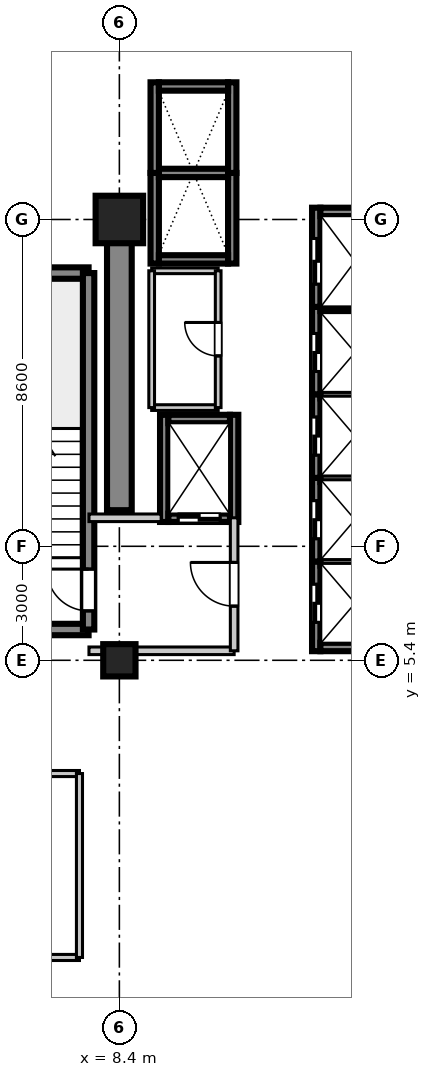
"""IFC4 building model, lengths in metres.
Left out: names, types, materials, properties, quantities, classifications, styles, units other than length and angle.
Written with IfcOpenShell. Run it as: python <this file> out.ifc"""

import sys

from ifc_helpers import new_model, si_unit, direction, frame, frame_2d, origin, origin_2d, place, context, subcontext, project, spatial, rectangle, extrude, source, transform, mapped, element, fill, save


model = new_model("IFC4")
c1 = context("Model", 3, precision=1e-05, world=origin(), true_north=direction((0.0, 1.0)))
c2 = subcontext(c1, "Body", "Model", "MODEL_VIEW")
j1 = project(units=[si_unit("LENGTHUNIT", "METRE"), si_unit("PLANEANGLEUNIT", "RADIAN")], contexts=[c1])
p1 = place(None, origin())
s1 = spatial("IfcSite", under=j1, at=p1, CompositionType="ELEMENT")
p2 = place(p1, origin())
s2 = spatial("IfcBuilding", under=s1, at=p2, CompositionType="ELEMENT")
p3 = place(p2, frame((0.0, 0.0, 102.9)))
s3 = spatial("IfcBuildingStorey", under=s2, at=p3, CompositionType="ELEMENT", Elevation=102.9)
m1 = source(origin(), c2, "Body", "SweptSolid", [
    extrude(rectangle(XDim=0.85, YDim=0.85, at=origin_2d()), origin(), (0.0, 0.0, 1.0), 3.605),
])
p4 = place(p3, frame((8.4, 5.4, 0.0), z_axis=(0.0, 0.0, 1.0), x_axis=(1.0, 0.0, 0.0)))
e1 = element("IfcColumn", 1, at=p4, inside=s3, PredefinedType="PILASTER", context=c2, shape_type="MappedRepresentation", body=[
    mapped(m1, transform((0.0, 0.0, 0.0), scale=1.0)),
])
m2 = source(origin(), c2, "Body", "SweptSolid", [
    extrude(rectangle(XDim=1.25, YDim=1.25, at=origin_2d()), origin(), (0.0, 0.0, 1.0), 3.605),
])
p5 = place(p3, frame((8.4, 17.0, 0.0), z_axis=(0.0, 0.0, 1.0), x_axis=(1.0, 0.0, 0.0)))
e2 = element("IfcColumn", 2, at=p5, inside=s3, PredefinedType="COLUMN", context=c2, shape_type="MappedRepresentation", body=[
    mapped(m2, transform((0.0, 0.0, 0.0), scale=1.0)),
])
m3 = source(origin(), c2, "Body", "SweptSolid", [
    extrude(rectangle(XDim=7.65, YDim=0.65, at=frame_2d((3.825, 0.0))), origin(), (0.0, 0.0, 1.0), 3.38),
])
p6 = place(p3, frame((8.4, 9.35, 0.0), z_axis=(0.0, 0.0, 1.0), x_axis=(0.0, 1.0, 0.0)))
e3 = element("IfcWall", 3, at=p6, inside=s3, PredefinedType="SHEAR", context=c2, shape_type="MappedRepresentation", body=[
    mapped(m3, transform((0.0, 0.0, 0.0), scale=1.0)),
])
m4 = source(origin(), c2, "Body", "SweptSolid", [
    extrude(rectangle(XDim=3.98, YDim=0.3, at=frame_2d((1.99, 0.0))), origin(), (0.0, 0.0, 1.0), 3.38),
])
for number, where, z_axis, x_axis in (
    (4, (3.61, 6.21, 0.0), (0.0, 0.0, 1.0), (1.0, 0.0, 0.0)),
    (5, (3.61, 15.59, 0.0), (0.0, 0.0, 1.0), (1.0, 0.0, 0.0)),
):
    element("IfcWall", number, at=place(p3, frame(where, z_axis=z_axis, x_axis=x_axis)), inside=s3, PredefinedType="SHEAR", context=c2, shape_type="MappedRepresentation", body=[
        mapped(m4, transform((0.0, 0.0, 0.0), scale=1.0)),
    ])
m5 = source(origin(), c2, "Body", "SweptSolid", [
    extrude(rectangle(XDim=9.38, YDim=0.3, at=frame_2d((4.69, 0.0))), origin(), (0.0, 0.0, 1.0), 3.38),
])
p7 = place(p3, frame((7.59, 6.21, 0.0), z_axis=(0.0, 0.0, 1.0), x_axis=(0.0, 1.0, 0.0)))
e6 = element("IfcWall", 6, at=p7, inside=s3, PredefinedType="SHEAR", context=c2, shape_type="MappedRepresentation", body=[
    mapped(m5, transform((0.0, 0.0, 0.0), scale=1.0)),
])
p8 = place(p7, frame((0.49, 0.0, 0.0)))
e7 = element("IfcOpeningElement", 7, at=p8, cuts=e6, PredefinedType="OPENING", context=c2, shape_type="SweptSolid", body=[
    extrude(rectangle(XDim=1.1, YDim=2.15, at=frame_2d((0.55, 1.075))), frame((0.0, 0.16, 0.0), z_axis=(0.0, -1.0, 0.0), x_axis=(1.0, 0.0, 0.0)), (0.0, 0.0, 1.0), 0.32),
])
m6 = source(origin(), c2, "Body", "SweptSolid", [
    extrude(rectangle(XDim=2.36, YDim=0.22, at=frame_2d((1.18, 0.0))), origin(), (0.0, 0.0, 1.0), 3.38),
])
p9 = place(p3, frame((13.58, 5.64, 0.0), z_axis=(0.0, 0.0, 1.0), x_axis=(0.0, 1.0, 0.0)))
e8 = element("IfcWall", 8, at=p9, inside=s3, PredefinedType="SHEAR", context=c2, shape_type="MappedRepresentation", body=[
    mapped(m6, transform((0.0, 0.0, 0.0), scale=1.0)),
])
p10 = place(p9, frame((0.76, 0.0, 0.0)))
e9 = element("IfcOpeningElement", 9, at=p10, cuts=e8, PredefinedType="OPENING", context=c2, shape_type="SweptSolid", body=[
    extrude(rectangle(XDim=1.0, YDim=2.2, at=frame_2d((0.5, 1.1))), frame((0.0, 0.12, 0.0), z_axis=(0.0, -1.0, 0.0), x_axis=(1.0, 0.0, 0.0)), (0.0, 0.0, 1.0), 0.24),
])
m7 = source(origin(), c2, "Body", "SweptSolid", [
    extrude(rectangle(XDim=1.82, YDim=0.22, at=frame_2d((0.91, 0.0))), origin(), (0.0, 0.0, 1.0), 3.38),
])
p11 = place(p3, frame((13.69, 5.75, 0.0), z_axis=(0.0, 0.0, 1.0), x_axis=(1.0, 0.0, 0.0)))
e10 = element("IfcWall", 10, at=p11, inside=s3, PredefinedType="SHEAR", context=c2, shape_type="MappedRepresentation", body=[
    mapped(m7, transform((0.0, 0.0, 0.0), scale=1.0)),
])
m8 = source(origin(), c2, "Body", "SweptSolid", [
    extrude(rectangle(XDim=1.82, YDim=0.22, at=frame_2d((0.91, 0.0))), origin(), (0.0, 0.0, 1.0), 3.65),
])
p12 = place(p3, frame((13.69, 8.0, 0.0), z_axis=(0.0, 0.0, 1.0), x_axis=(1.0, 0.0, 0.0)))
e11 = element("IfcWall", 11, at=p12, inside=s3, PredefinedType="SHEAR", context=c2, shape_type="MappedRepresentation", body=[
    mapped(m8, transform((0.0, 0.0, 0.0), scale=1.0)),
])
m9 = source(origin(), c2, "Body", "SweptSolid", [
    extrude(rectangle(XDim=2.2, YDim=0.22, at=frame_2d((1.1, 0.0))), origin(), (0.0, 0.0, 1.0), 3.38),
])
p13 = place(p3, frame((13.58, 8.0, 0.0), z_axis=(0.0, 0.0, 1.0), x_axis=(0.0, 1.0, 0.0)))
e12 = element("IfcWall", 12, at=p13, inside=s3, PredefinedType="SHEAR", context=c2, shape_type="MappedRepresentation", body=[
    mapped(m9, transform((0.0, 0.0, 0.0), scale=1.0)),
])
p14 = place(p13, frame((0.6, 0.0, 0.0)))
e13 = element("IfcOpeningElement", 13, at=p14, cuts=e12, PredefinedType="OPENING", context=c2, shape_type="SweptSolid", body=[
    extrude(rectangle(XDim=1.0, YDim=2.2, at=frame_2d((0.5, 1.1))), frame((0.0, 0.12, 0.0), z_axis=(0.0, -1.0, 0.0), x_axis=(1.0, 0.0, 0.0)), (0.0, 0.0, 1.0), 0.24),
])
p15 = place(p3, frame((13.69, 10.2, 0.0), z_axis=(0.0, 0.0, 1.0), x_axis=(1.0, 0.0, 0.0)))
e14 = element("IfcWall", 14, at=p15, inside=s3, PredefinedType="SHEAR", context=c2, shape_type="MappedRepresentation", body=[
    mapped(m8, transform((0.0, 0.0, 0.0), scale=1.0)),
])
p16 = place(p3, frame((13.58, 10.2, 0.0), z_axis=(0.0, 0.0, 1.0), x_axis=(0.0, 1.0, 0.0)))
e15 = element("IfcWall", 15, at=p16, inside=s3, PredefinedType="SHEAR", context=c2, shape_type="MappedRepresentation", body=[
    mapped(m9, transform((0.0, 0.0, 0.0), scale=1.0)),
])
p17 = place(p16, frame((0.6, 0.0, 0.0)))
e16 = element("IfcOpeningElement", 16, at=p17, cuts=e15, PredefinedType="OPENING", context=c2, shape_type="SweptSolid", body=[
    extrude(rectangle(XDim=1.0, YDim=2.2, at=frame_2d((0.5, 1.1))), frame((0.0, 0.12, 0.0), z_axis=(0.0, -1.0, 0.0), x_axis=(1.0, 0.0, 0.0)), (0.0, 0.0, 1.0), 0.24),
])
p18 = place(p3, frame((13.69, 12.4, 0.0), z_axis=(0.0, 0.0, 1.0), x_axis=(1.0, 0.0, 0.0)))
e17 = element("IfcWall", 17, at=p18, inside=s3, PredefinedType="SHEAR", context=c2, shape_type="MappedRepresentation", body=[
    mapped(m8, transform((0.0, 0.0, 0.0), scale=1.0)),
])
m10 = source(origin(), c2, "Body", "SweptSolid", [
    extrude(rectangle(XDim=2.3, YDim=0.22, at=frame_2d((1.15, 0.0))), origin(), (0.0, 0.0, 1.0), 3.38),
])
p19 = place(p3, frame((13.58, 12.4, 0.0), z_axis=(0.0, 0.0, 1.0), x_axis=(0.0, 1.0, 0.0)))
e18 = element("IfcWall", 18, at=p19, inside=s3, PredefinedType="SHEAR", context=c2, shape_type="MappedRepresentation", body=[
    mapped(m10, transform((0.0, 0.0, 0.0), scale=1.0)),
])
p20 = place(p19, frame((0.6, 0.0, 0.0)))
e19 = element("IfcOpeningElement", 19, at=p20, cuts=e18, PredefinedType="OPENING", context=c2, shape_type="SweptSolid", body=[
    extrude(rectangle(XDim=1.0, YDim=2.2, at=frame_2d((0.5, 1.1))), frame((0.0, 0.12, 0.0), z_axis=(0.0, -1.0, 0.0), x_axis=(1.0, 0.0, 0.0)), (0.0, 0.0, 1.0), 0.24),
])
p21 = place(p3, frame((13.69, 14.7, 0.0), z_axis=(0.0, 0.0, 1.0), x_axis=(1.0, 0.0, 0.0)))
e20 = element("IfcWall", 20, at=p21, inside=s3, PredefinedType="SHEAR", context=c2, shape_type="MappedRepresentation", body=[
    mapped(m8, transform((0.0, 0.0, 0.0), scale=1.0)),
])
m11 = source(origin(), c2, "Body", "SweptSolid", [
    extrude(rectangle(XDim=2.385, YDim=0.22, at=frame_2d((1.192, 0.0))), origin(), (0.0, 0.0, 1.0), 3.38),
])
for number, where, z_axis, x_axis in (
    (21, (9.33, 15.84, 0.0), (0.0, 0.0, 1.0), (0.0, 1.0, 0.0)),
    (22, (11.37, 15.84, 0.0), (0.0, 0.0, 1.0), (0.0, 1.0, 0.0)),
):
    element("IfcWall", number, at=place(p3, frame(where, z_axis=z_axis, x_axis=x_axis)), inside=s3, PredefinedType="SHEAR", context=c2, shape_type="MappedRepresentation", body=[
        mapped(m11, transform((0.0, 0.0, 0.0), scale=1.0)),
    ])
p22 = place(p3, frame((9.44, 15.95, 0.0), z_axis=(0.0, 0.0, 1.0), x_axis=(1.0, 0.0, 0.0)))
e23 = element("IfcWall", 23, at=p22, inside=s3, PredefinedType="SHEAR", context=c2, shape_type="MappedRepresentation", body=[
    mapped(m7, transform((0.0, 0.0, 0.0), scale=1.0)),
])
p23 = place(p3, frame((9.44, 18.225, 0.0), z_axis=(0.0, 0.0, 1.0), x_axis=(1.0, 0.0, 0.0)))
e24 = element("IfcWall", 24, at=p23, inside=s3, PredefinedType="SHEAR", context=c2, shape_type="MappedRepresentation", body=[
    mapped(m8, transform((0.0, 0.0, 0.0), scale=1.0)),
])
for number, where, z_axis, x_axis in (
    (25, (9.33, 18.225, 0.0), (0.0, 0.0, 1.0), (0.0, 1.0, 0.0)),
    (26, (11.37, 18.225, 0.0), (0.0, 0.0, 1.0), (0.0, 1.0, 0.0)),
):
    element("IfcWall", number, at=place(p3, frame(where, z_axis=z_axis, x_axis=x_axis)), inside=s3, PredefinedType="SHEAR", context=c2, shape_type="MappedRepresentation", body=[
        mapped(m11, transform((0.0, 0.0, 0.0), scale=1.0)),
    ])
p24 = place(p3, frame((9.44, 20.5, 0.0), z_axis=(0.0, 0.0, 1.0), x_axis=(1.0, 0.0, 0.0)))
e27 = element("IfcWall", 27, at=p24, inside=s3, PredefinedType="SHEAR", context=c2, shape_type="MappedRepresentation", body=[
    mapped(m7, transform((0.0, 0.0, 0.0), scale=1.0)),
])
m12 = source(origin(), c2, "Body", "SweptSolid", [
    extrude(rectangle(XDim=2.82, YDim=0.22, at=frame_2d((1.41, 0.0))), origin(), (0.0, 0.0, 1.0), 3.38),
])
for number, where, z_axis, x_axis in (
    (28, (9.58, 9.04, 0.0), (0.0, 0.0, 1.0), (0.0, 1.0, 0.0)),
    (29, (11.42, 9.04, 0.0), (0.0, 0.0, 1.0), (0.0, 1.0, 0.0)),
):
    element("IfcWall", number, at=place(p3, frame(where, z_axis=z_axis, x_axis=x_axis)), inside=s3, PredefinedType="SHEAR", context=c2, shape_type="MappedRepresentation", body=[
        mapped(m12, transform((0.0, 0.0, 0.0), scale=1.0)),
    ])
m13 = source(origin(), c2, "Body", "SweptSolid", [
    extrude(rectangle(XDim=1.62, YDim=0.22, at=frame_2d((0.81, 0.0))), origin(), (0.0, 0.0, 1.0), 3.38),
])
p25 = place(p3, frame((9.69, 9.15, 0.0), z_axis=(0.0, 0.0, 1.0), x_axis=(1.0, 0.0, 0.0)))
e30 = element("IfcWall", 30, at=p25, inside=s3, PredefinedType="SHEAR", context=c2, shape_type="MappedRepresentation", body=[
    mapped(m13, transform((0.0, 0.0, 0.0), scale=1.0)),
])
p26 = place(p25, frame((0.26, 0.0, 0.0)))
e31 = element("IfcOpeningElement", 31, at=p26, cuts=e30, PredefinedType="OPENING", context=c2, shape_type="SweptSolid", body=[
    extrude(rectangle(XDim=1.1, YDim=2.2, at=frame_2d((0.55, 1.1))), frame((0.0, 0.12, 0.0), z_axis=(0.0, -1.0, 0.0), x_axis=(1.0, 0.0, 0.0)), (0.0, 0.0, 1.0), 0.24),
])
p27 = place(p3, frame((9.69, 11.75, 0.0), z_axis=(0.0, 0.0, 1.0), x_axis=(1.0, 0.0, 0.0)))
e32 = element("IfcWall", 32, at=p27, inside=s3, PredefinedType="SHEAR", context=c2, shape_type="MappedRepresentation", body=[
    mapped(m13, transform((0.0, 0.0, 0.0), scale=1.0)),
])
m14 = source(origin(), c2, "Body", "SweptSolid", [
    extrude(rectangle(XDim=2.61, YDim=0.22, at=frame_2d((1.305, 0.0))), origin(), (0.0, 0.0, 1.0), 3.38),
])
p28 = place(p3, frame((13.58, 14.7, 0.0), z_axis=(0.0, 0.0, 1.0), x_axis=(0.0, 1.0, 0.0)))
e33 = element("IfcWall", 33, at=p28, inside=s3, PredefinedType="SHEAR", context=c2, shape_type="MappedRepresentation", body=[
    mapped(m14, transform((0.0, 0.0, 0.0), scale=1.0)),
])
p29 = place(p28, frame((0.6, 0.0, 0.0)))
e34 = element("IfcOpeningElement", 34, at=p29, cuts=e33, PredefinedType="OPENING", context=c2, shape_type="SweptSolid", body=[
    extrude(rectangle(XDim=1.2, YDim=2.2, at=frame_2d((0.6, 1.1))), frame((0.0, 0.12, 0.0), z_axis=(0.0, -1.0, 0.0), x_axis=(1.0, 0.0, 0.0)), (0.0, 0.0, 1.0), 0.24),
])
p30 = place(p3, frame((13.69, 17.2, 0.0), z_axis=(0.0, 0.0, 1.0), x_axis=(1.0, 0.0, 0.0)))
e35 = element("IfcWall", 35, at=p30, inside=s3, PredefinedType="SHEAR", context=c2, shape_type="MappedRepresentation", body=[
    mapped(m7, transform((0.0, 0.0, 0.0), scale=1.0)),
])
m15 = source(origin(), c2, "Body", "SweptSolid", [
    extrude(rectangle(XDim=3.82, YDim=0.2, at=frame_2d((1.91, 0.0))), origin(), (0.0, 0.0, 1.0), 2.72),
])
p31 = place(p3, frame((7.6, 5.65, 0.0), z_axis=(0.0, 0.0, 1.0), x_axis=(1.0, 0.0, 0.0)))
e36 = element("IfcWall", 36, at=p31, inside=s3, PredefinedType="PARTITIONING", context=c2, shape_type="MappedRepresentation", body=[
    mapped(m15, transform((0.0, 0.0, 0.0), scale=1.0)),
])
m16 = source(origin(), c2, "Body", "SweptSolid", [
    extrude(rectangle(XDim=1.9, YDim=0.2, at=frame_2d((0.95, 0.0))), origin(), (0.0, 0.0, 1.0), 2.72),
])
p32 = place(p3, frame((7.6, 9.15, 0.0), z_axis=(0.0, 0.0, 1.0), x_axis=(1.0, 0.0, 0.0)))
e37 = element("IfcWall", 37, at=p32, inside=s3, PredefinedType="PARTITIONING", context=c2, shape_type="MappedRepresentation", body=[
    mapped(m16, transform((0.0, 0.0, 0.0), scale=1.0)),
])
m17 = source(origin(), c2, "Body", "SweptSolid", [
    extrude(rectangle(XDim=3.5, YDim=0.2, at=frame_2d((1.75, 0.0))), origin(), (0.0, 0.0, 1.0), 2.72),
])
p33 = place(p3, frame((11.42, 5.65, 0.0), z_axis=(0.0, 0.0, 1.0), x_axis=(0.0, 1.0, 0.0)))
e38 = element("IfcWall", 38, at=p33, inside=s3, PredefinedType="PARTITIONING", context=c2, shape_type="MappedRepresentation", body=[
    mapped(m17, transform((0.0, 0.0, 0.0), scale=1.0)),
])
p34 = place(p33, frame((1.175, 0.0, 0.0)))
e39 = element("IfcOpeningElement", 39, at=p34, cuts=e38, PredefinedType="OPENING", context=c2, shape_type="SweptSolid", body=[
    extrude(rectangle(XDim=1.15, YDim=2.15, at=frame_2d((0.575, 1.075))), frame((0.0, 0.11, 0.0), z_axis=(0.0, -1.0, 0.0), x_axis=(1.0, 0.0, 0.0)), (0.0, 0.0, 1.0), 0.22),
])
m18 = source(origin(), c2, "Body", "SweptSolid", [
    extrude(rectangle(XDim=1.75, YDim=0.15, at=frame_2d((0.875, 0.0))), origin(), (0.0, 0.0, 1.0), 2.72),
])
for number, where, z_axis, x_axis in (
    (40, (9.25, 12.05, 0.0), (0.0, 0.0, 1.0), (1.0, 0.0, 0.0)),
    (41, (9.25, 15.65, 0.0), (0.0, 0.0, 1.0), (1.0, 0.0, 0.0)),
):
    element("IfcWall", number, at=place(p3, frame(where, z_axis=z_axis, x_axis=x_axis)), inside=s3, PredefinedType="PARTITIONING", context=c2, shape_type="MappedRepresentation", body=[
        mapped(m18, transform((0.0, 0.0, 0.0), scale=1.0)),
    ])
m19 = source(origin(), c2, "Body", "SweptSolid", [
    extrude(rectangle(XDim=3.6, YDim=0.15, at=frame_2d((1.8, 0.0))), origin(), (0.0, 0.0, 1.0), 2.72),
])
p35 = place(p3, frame((9.25, 12.05, 0.0), z_axis=(0.0, 0.0, 1.0), x_axis=(0.0, 1.0, 0.0)))
e42 = element("IfcWall", 42, at=p35, inside=s3, PredefinedType="PARTITIONING", context=c2, shape_type="MappedRepresentation", body=[
    mapped(m19, transform((0.0, 0.0, 0.0), scale=1.0)),
])
p36 = place(p3, frame((11.0, 12.05, 0.0), z_axis=(0.0, 0.0, 1.0), x_axis=(0.0, 1.0, 0.0)))
e43 = element("IfcWall", 43, at=p36, inside=s3, PredefinedType="PARTITIONING", context=c2, shape_type="MappedRepresentation", body=[
    mapped(m19, transform((0.0, 0.0, 0.0), scale=1.0)),
])
p37 = place(p36, frame((1.36, 0.0, 0.0)))
e44 = element("IfcOpeningElement", 44, at=p37, cuts=e43, PredefinedType="OPENING", context=c2, shape_type="SweptSolid", body=[
    extrude(rectangle(XDim=0.88, YDim=2.1, at=frame_2d((0.44, 1.05))), frame((0.0, 0.085, 0.0), z_axis=(0.0, -1.0, 0.0), x_axis=(1.0, 0.0, 0.0)), (0.0, 0.0, 1.0), 0.17),
])
m20 = source(origin(), c2, "Body", "SweptSolid", [
    extrude(rectangle(XDim=6.732, YDim=0.16, at=frame_2d((3.366, 0.0))), origin(), (0.0, 0.0, 1.0), 2.72),
])
p38 = place(p3, frame((0.618, -2.42, 0.0), z_axis=(0.0, 0.0, 1.0), x_axis=(1.0, 0.0, 0.0)))
e45 = element("IfcWall", 45, at=p38, inside=s3, PredefinedType="PARTITIONING", context=c2, shape_type="MappedRepresentation", body=[
    mapped(m20, transform((0.0, 0.0, 0.0), scale=1.0)),
])
p39 = place(p3, frame((0.618, 2.42, 0.0), z_axis=(0.0, 0.0, 1.0), x_axis=(1.0, 0.0, 0.0)))
e46 = element("IfcWall", 46, at=p39, inside=s3, PredefinedType="PARTITIONING", context=c2, shape_type="MappedRepresentation", body=[
    mapped(m20, transform((0.0, 0.0, 0.0), scale=1.0)),
])
p40 = place(p39, frame((4.379, 0.0, 0.0)))
e47 = element("IfcOpeningElement", 47, at=p40, cuts=e46, PredefinedType="OPENING", context=c2, shape_type="SweptSolid", body=[
    extrude(rectangle(XDim=1.0, YDim=2.1, at=frame_2d((0.5, 1.05))), frame((0.0, 0.09, 0.0), z_axis=(0.0, -1.0, 0.0), x_axis=(1.0, 0.0, 0.0)), (0.0, 0.0, 1.0), 0.18),
])
m21 = source(origin(), c2, "Body", "SweptSolid", [
    extrude(rectangle(XDim=4.84, YDim=0.16, at=frame_2d((2.42, 0.0))), origin(), (0.0, 0.0, 1.0), 2.72),
])
p41 = place(p3, frame((7.35, -2.42, 0.0), z_axis=(0.0, 0.0, 1.0), x_axis=(0.0, 1.0, 0.0)))
e48 = element("IfcWall", 48, at=p41, inside=s3, PredefinedType="PARTITIONING", context=c2, shape_type="MappedRepresentation", body=[
    mapped(m21, transform((0.0, 0.0, 0.0), scale=1.0)),
])
m22 = source(origin(), c2, "Body", "SweptSolid", [
    extrude(rectangle(XDim=1.1, YDim=2.15, at=frame_2d((0.55, 1.075))), frame((0.0, 0.025, 0.0), z_axis=(0.0, -1.0, 0.0), x_axis=(1.0, 0.0, 0.0)), (0.0, 0.0, 1.0), 0.05),
])
p42 = place(p8, origin())
e49 = element("IfcDoor", 49, at=p42, inside=s3, OperationType="SINGLE_SWING_RIGHT", PredefinedType="DOOR", context=c2, shape_type="MappedRepresentation", body=[
    mapped(m22, transform((0.0, 0.0, 0.0), scale=1.0)),
])
fill(e7, e49)
m23 = source(origin(), c2, "Body", "SweptSolid", [
    extrude(rectangle(XDim=1.0, YDim=2.2, at=frame_2d((0.5, 1.1))), frame((0.0, 0.025, 0.0), z_axis=(0.0, -1.0, 0.0), x_axis=(1.0, 0.0, 0.0)), (0.0, 0.0, 1.0), 0.05),
])
p43 = place(p10, origin())
e50 = element("IfcDoor", 50, at=p43, inside=s3, OperationType="DOUBLE_DOOR_SLIDING", PredefinedType="DOOR", context=c2, shape_type="MappedRepresentation", body=[
    mapped(m23, transform((0.0, 0.0, 0.0), scale=1.0)),
])
fill(e9, e50)
p44 = place(p14, origin())
e51 = element("IfcDoor", 51, at=p44, inside=s3, OperationType="DOUBLE_DOOR_SLIDING", PredefinedType="DOOR", context=c2, shape_type="MappedRepresentation", body=[
    mapped(m23, transform((0.0, 0.0, 0.0), scale=1.0)),
])
fill(e13, e51)
p45 = place(p17, origin())
e52 = element("IfcDoor", 52, at=p45, inside=s3, OperationType="DOUBLE_DOOR_SLIDING", PredefinedType="DOOR", context=c2, shape_type="MappedRepresentation", body=[
    mapped(m23, transform((0.0, 0.0, 0.0), scale=1.0)),
])
fill(e16, e52)
p46 = place(p20, origin())
e53 = element("IfcDoor", 53, at=p46, inside=s3, OperationType="DOUBLE_DOOR_SLIDING", PredefinedType="DOOR", context=c2, shape_type="MappedRepresentation", body=[
    mapped(m23, transform((0.0, 0.0, 0.0), scale=1.0)),
])
fill(e19, e53)
m24 = source(origin(), c2, "Body", "SweptSolid", [
    extrude(rectangle(XDim=1.1, YDim=2.2, at=frame_2d((0.55, 1.1))), frame((0.0, 0.025, 0.0), z_axis=(0.0, -1.0, 0.0), x_axis=(1.0, 0.0, 0.0)), (0.0, 0.0, 1.0), 0.05),
])
p47 = place(p26, frame((1.1, 0.0, 0.0), z_axis=(0.0, 0.0, 1.0), x_axis=(-1.0, 0.0, 0.0)))
e54 = element("IfcDoor", 54, at=p47, inside=s3, OperationType="DOUBLE_DOOR_SLIDING", PredefinedType="DOOR", context=c2, shape_type="MappedRepresentation", body=[
    mapped(m24, transform((0.0, 0.0, 0.0), scale=1.0)),
])
fill(e31, e54)
m25 = source(origin(), c2, "Body", "SweptSolid", [
    extrude(rectangle(XDim=1.2, YDim=2.2, at=frame_2d((0.6, 1.1))), frame((0.0, 0.025, 0.0), z_axis=(0.0, -1.0, 0.0), x_axis=(1.0, 0.0, 0.0)), (0.0, 0.0, 1.0), 0.05),
])
p48 = place(p29, origin())
e55 = element("IfcDoor", 55, at=p48, inside=s3, OperationType="DOUBLE_DOOR_SLIDING", PredefinedType="DOOR", context=c2, shape_type="MappedRepresentation", body=[
    mapped(m25, transform((0.0, 0.0, 0.0), scale=1.0)),
])
fill(e34, e55)
m26 = source(origin(), c2, "Body", "SweptSolid", [
    extrude(rectangle(XDim=1.15, YDim=2.15, at=frame_2d((0.575, 1.075))), frame((0.0, 0.025, 0.0), z_axis=(0.0, -1.0, 0.0), x_axis=(1.0, 0.0, 0.0)), (0.0, 0.0, 1.0), 0.05),
])
p49 = place(p34, frame((1.15, 0.0, 0.0), z_axis=(0.0, 0.0, 1.0), x_axis=(-1.0, 0.0, 0.0)))
e56 = element("IfcDoor", 56, at=p49, inside=s3, OperationType="SINGLE_SWING_RIGHT", PredefinedType="DOOR", context=c2, shape_type="MappedRepresentation", body=[
    mapped(m26, transform((0.0, 0.0, 0.0), scale=1.0)),
])
fill(e39, e56)
m27 = source(origin(), c2, "Body", "SweptSolid", [
    extrude(rectangle(XDim=0.88, YDim=2.1, at=frame_2d((0.44, 1.05))), frame((0.0, 0.025, 0.0), z_axis=(0.0, -1.0, 0.0), x_axis=(1.0, 0.0, 0.0)), (0.0, 0.0, 1.0), 0.05),
])
p50 = place(p37, origin())
e57 = element("IfcDoor", 57, at=p50, inside=s3, OperationType="SINGLE_SWING_RIGHT", PredefinedType="DOOR", context=c2, shape_type="MappedRepresentation", body=[
    mapped(m27, transform((0.0, 0.0, 0.0), scale=1.0)),
])
fill(e44, e57)
save(model, sys.argv[1])
